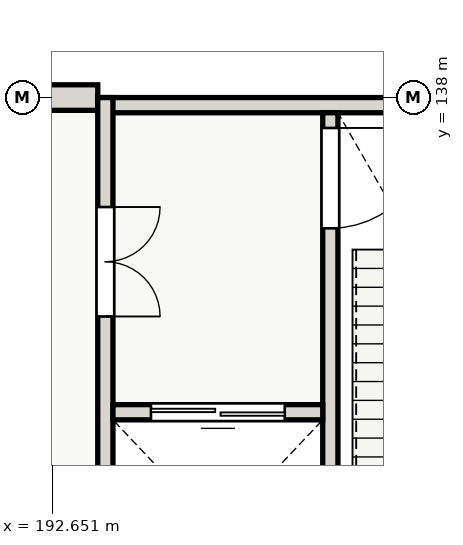
"""IFC4 building model, lengths in metres.
Left out: names, types, materials, properties, quantities, classifications, styles, units other than length and angle.
Written with IfcOpenShell. Run it as: python <this file> out.ifc"""

import sys

from ifc_helpers import new_model, si_unit, direction, frame, frame_2d, origin, place, context, subcontext, project, spatial, rectangle, extrude, element, fill, save


model = new_model("IFC4")
c1 = context("Model", 3, precision=1e-05, world=origin(), true_north=direction((0.0, 1.0)))
c2 = subcontext(c1, "Body", "Model", "MODEL_VIEW")
j1 = project(units=[si_unit("LENGTHUNIT", "METRE"), si_unit("PLANEANGLEUNIT", "RADIAN")], contexts=[c1])
p1 = place(None, origin())
s1 = spatial("IfcSite", under=j1, at=p1, CompositionType="ELEMENT")
p2 = place(p1, origin())
s2 = spatial("IfcBuilding", under=s1, at=p2, CompositionType="ELEMENT")
p3 = place(p2, frame((0.0, 0.0, 4.2)))
s3 = spatial("IfcBuildingStorey", under=s2, at=p3, CompositionType="ELEMENT", Elevation=4.2)
p4 = place(p3, frame((192.0, 138.0, 0.0), z_axis=(0.0, 0.0, 1.0), x_axis=(1.0, 0.0, 0.0)))
e1 = element("IfcWall", 1, at=p4, inside=s3, PredefinedType="SOLIDWALL", context=c2, shape_type="SweptSolid", body=[
    extrude(rectangle(XDim=1.4, YDim=0.42, at=frame_2d((0.7, 0.0))), origin(), (0.0, 0.0, 1.0), 3.53),
])
p5 = place(p3, frame((193.4, 137.875, 0.0), z_axis=(0.0, 0.0, 1.0), x_axis=(1.0, 0.0, 0.0)))
e2 = element("IfcWall", 2, at=p5, inside=s3, PredefinedType="SHEAR", context=c2, shape_type="SweptSolid", body=[
    extrude(rectangle(XDim=9.2, YDim=0.25, at=frame_2d((4.6, 0.0))), origin(), (0.0, 0.0, 1.0), 4.2),
])
p6 = place(p3, frame((193.525, 138.0, 0.0), z_axis=(0.0, 0.0, 1.0), x_axis=(0.0, -1.0, 0.0)))
e3 = element("IfcWall", 3, at=p6, inside=s3, PredefinedType="SHEAR", context=c2, shape_type="SweptSolid", body=[
    extrude(rectangle(XDim=9.2, YDim=0.25, at=frame_2d((4.6, 0.0))), origin(), (0.0, 0.0, 1.0), 4.2),
])
p7 = place(p6, frame((1.8, 0.0, 0.0)))
e4 = element("IfcOpeningElement", 4, at=p7, cuts=e3, PredefinedType="OPENING", context=c2, shape_type="SweptSolid", body=[
    extrude(rectangle(XDim=1.8, YDim=2.15, at=frame_2d((0.9, 1.075))), frame((0.0, 0.135, 0.0), z_axis=(0.0, -1.0, 0.0), x_axis=(1.0, 0.0, 0.0)), (0.0, 0.0, 1.0), 0.27),
])
p8 = place(p3, frame((197.225, 137.75, 0.0), z_axis=(0.0, 0.0, 1.0), x_axis=(0.0, -1.0, 0.0)))
e5 = element("IfcWall", 5, at=p8, inside=s3, PredefinedType="SHEAR", context=c2, shape_type="SweptSolid", body=[
    extrude(rectangle(XDim=8.7, YDim=0.25, at=frame_2d((4.35, 0.0))), origin(), (0.0, 0.0, 1.0), 4.2),
])
p9 = place(p8, frame((0.25, 0.0, 0.0)))
e6 = element("IfcOpeningElement", 6, at=p9, cuts=e5, PredefinedType="OPENING", context=c2, shape_type="SweptSolid", body=[
    extrude(rectangle(XDim=1.65, YDim=2.1, at=frame_2d((0.825, 1.05))), frame((0.0, 0.135, 0.0), z_axis=(0.0, -1.0, 0.0), x_axis=(1.0, 0.0, 0.0)), (0.0, 0.0, 1.0), 0.27),
])
p10 = place(p3, frame((197.1, 132.825, 0.0), z_axis=(0.0, 0.0, 1.0), x_axis=(-1.0, 0.0, 0.0)))
e7 = element("IfcWall", 7, at=p10, inside=s3, PredefinedType="SHEAR", context=c2, shape_type="SweptSolid", body=[
    extrude(rectangle(XDim=3.45, YDim=0.25, at=frame_2d((1.725, 0.0))), origin(), (0.0, 0.0, 1.0), 4.2),
])
p11 = place(p10, frame((0.625, 0.0, 0.0)))
e8 = element("IfcOpeningElement", 8, at=p11, cuts=e7, PredefinedType="OPENING", context=c2, shape_type="SweptSolid", body=[
    extrude(rectangle(XDim=2.2, YDim=2.35, at=frame_2d((1.1, 1.175))), frame((0.0, 0.135, 0.0), z_axis=(0.0, -1.0, 0.0), x_axis=(1.0, 0.0, 0.0)), (0.0, 0.0, 1.0), 0.27),
])
p12 = place(p7, origin())
e9 = element("IfcDoor", 9, at=p12, inside=s3, OperationType="DOUBLE_DOOR_SINGLE_SWING", PredefinedType="DOOR", context=c2, shape_type="SweptSolid", body=[
    extrude(rectangle(XDim=1.8, YDim=2.15, at=frame_2d((0.9, 1.075))), frame((0.0, 0.025, 0.0), z_axis=(0.0, -1.0, 0.0), x_axis=(1.0, 0.0, 0.0)), (0.0, 0.0, 1.0), 0.05),
])
fill(e4, e9)
p13 = place(p9, origin())
e10 = element("IfcDoor", 10, at=p13, inside=s3, OperationType="SINGLE_SWING_LEFT", PredefinedType="DOOR", context=c2, shape_type="SweptSolid", body=[
    extrude(rectangle(XDim=1.65, YDim=2.1, at=frame_2d((0.825, 1.05))), frame((0.0, 0.025, 0.0), z_axis=(0.0, -1.0, 0.0), x_axis=(1.0, 0.0, 0.0)), (0.0, 0.0, 1.0), 0.05),
])
fill(e6, e10)
p14 = place(p11, origin())
e11 = element("IfcDoor", 11, at=p14, inside=s3, OperationType="SLIDING_TO_RIGHT", PredefinedType="DOOR", context=c2, shape_type="SweptSolid", body=[
    extrude(rectangle(XDim=2.2, YDim=2.35, at=frame_2d((1.1, 1.175))), frame((0.0, 0.025, 0.0), z_axis=(0.0, -1.0, 0.0), x_axis=(1.0, 0.0, 0.0)), (0.0, 0.0, 1.0), 0.05),
])
fill(e8, e11)
save(model, sys.argv[1])
